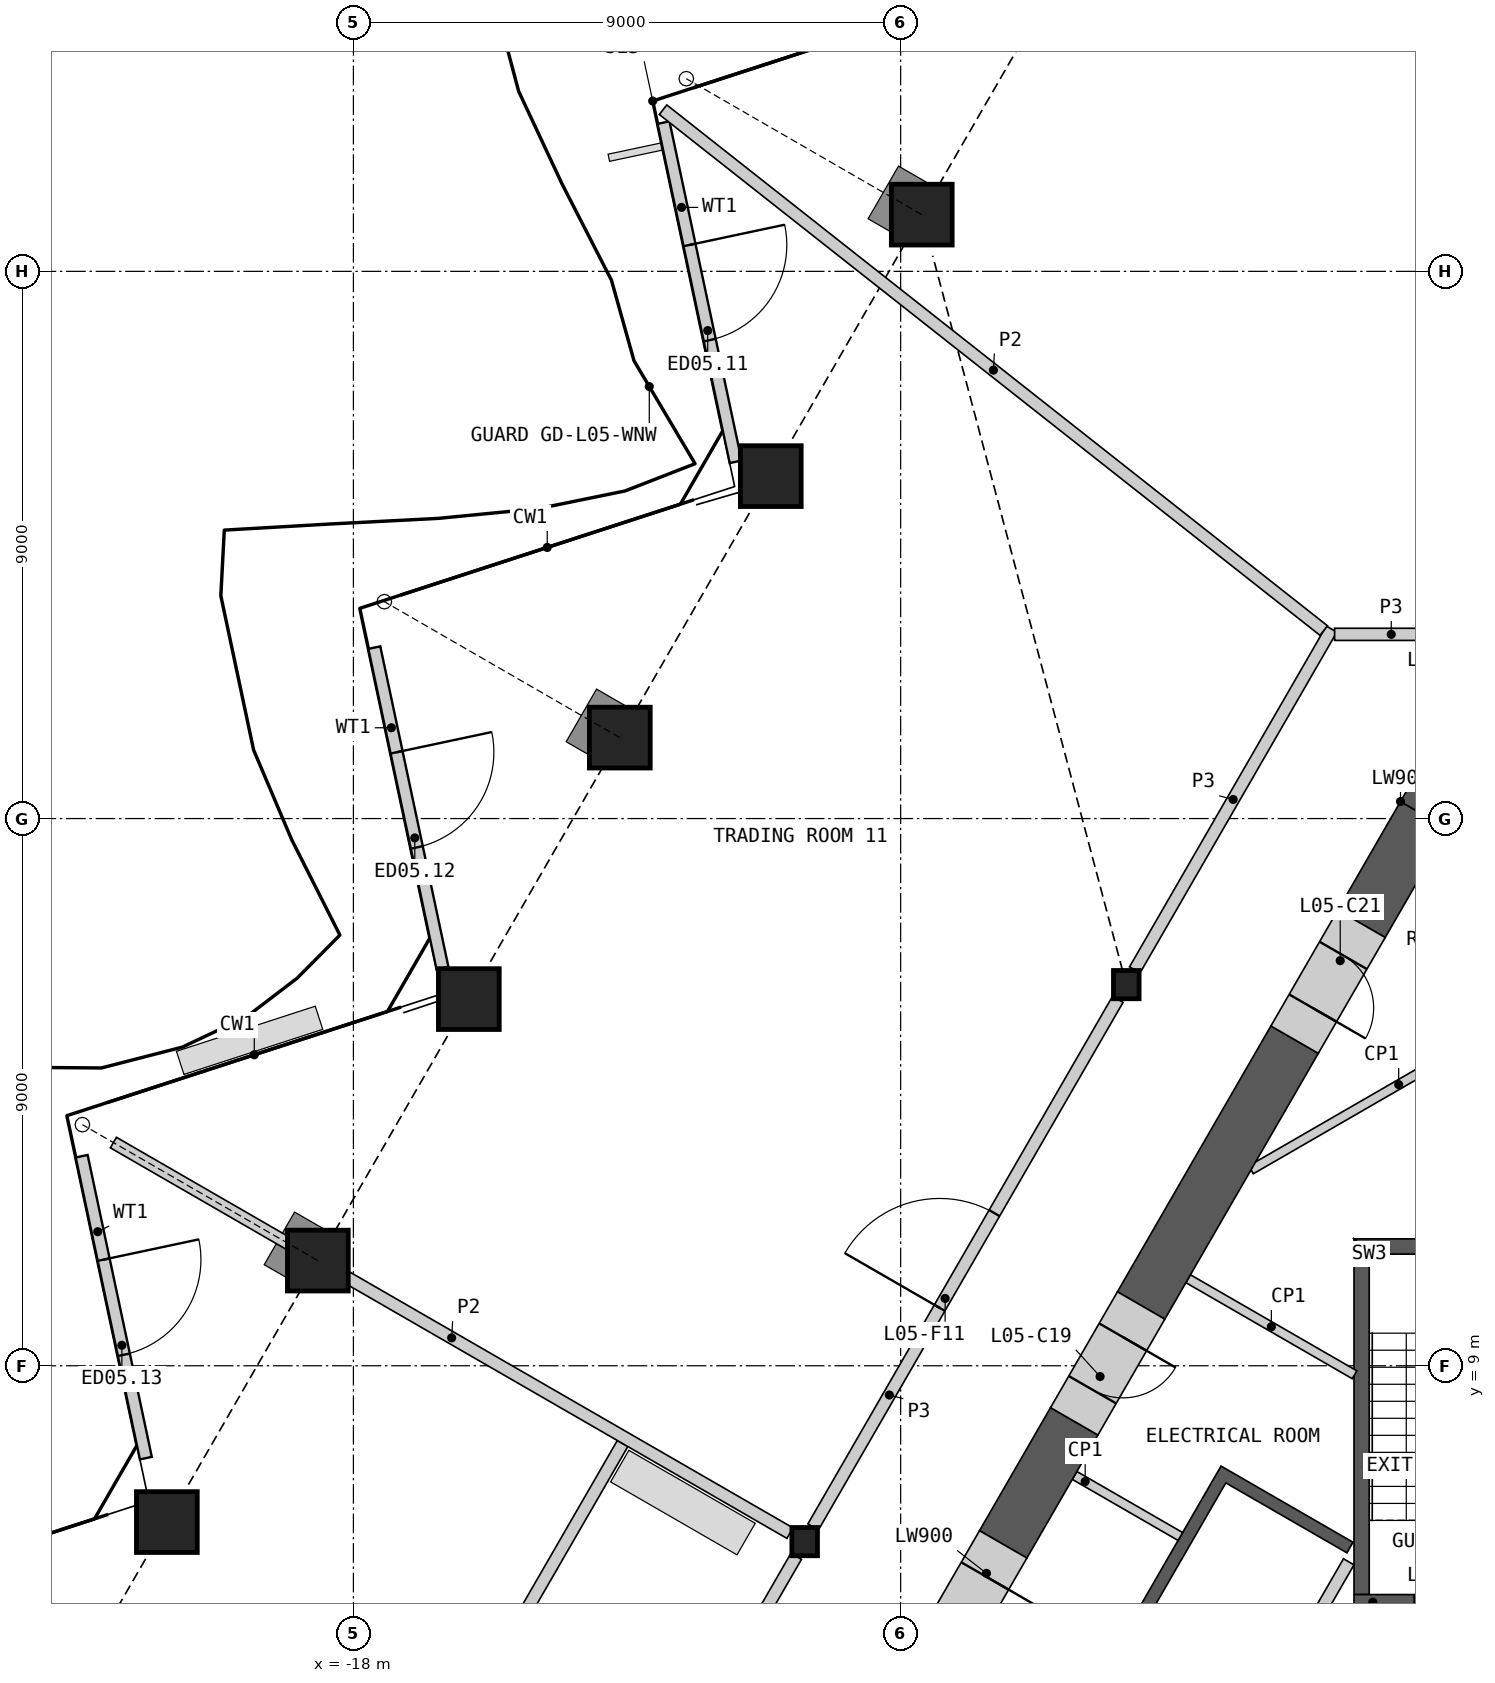
"""IFC4 building model, lengths in metres.
Left out: names, types, materials, properties, quantities, classifications, styles, units other than length and angle.
Written with IfcOpenShell. Run it as: python <this file> out.ifc"""

import sys

from ifc_helpers import new_model, si_unit, direction, frame, frame_2d, origin, origin_2d, place, context, subcontext, project, spatial, polyline, rectangle, hollow_rectangle, i_section, outline, extrude, element, fill, save


model = new_model("IFC4")
c1 = context("Model", 3, precision=1e-05, world=origin(), true_north=direction((0.0, 1.0)))
c2 = subcontext(c1, "Body", "Model", "MODEL_VIEW")
j1 = project(units=[si_unit("LENGTHUNIT", "METRE"), si_unit("PLANEANGLEUNIT", "RADIAN")], contexts=[c1])
p1 = place(None, origin())
s1 = spatial("IfcSite", under=j1, at=p1, CompositionType="ELEMENT")
p2 = place(p1, origin())
s2 = spatial("IfcBuilding", under=s1, at=p2, CompositionType="ELEMENT")
p3 = place(p2, frame((0.0, 0.0, 30.0)))
s3 = spatial("IfcBuildingStorey", under=s2, at=p3, CompositionType="ELEMENT", Elevation=30.0)
p4 = place(p3, frame((-8.653, 27.933, 0.0), z_axis=(-0.631248593533, 0.36445433234, 0.684615405028), x_axis=(-0.500002867593, -0.866023748172, 0.0)))
e1 = element("IfcColumn", 1, at=p4, inside=s3, PredefinedType="COLUMN", context=c2, shape_type="SweptSolid", body=[
    extrude(hollow_rectangle(XDim=1.0, YDim=1.0, WallThickness=0.07, at=origin_2d()), frame((0.0, 0.0, 0.532)), (0.0, 0.0, 1.0), 5.07),
])
p5 = place(p3, frame((-11.136, 23.632, 0.0), z_axis=(0.0, 0.0, 1.0), x_axis=(1.0, 0.0, 0.0)))
e2 = element("IfcColumn", 2, at=p5, inside=s3, PredefinedType="COLUMN", context=c2, shape_type="SweptSolid", body=[
    extrude(hollow_rectangle(XDim=1.0, YDim=1.0, WallThickness=0.07, at=origin_2d()), origin(), (0.0, 0.0, 1.0), 4.2),
])
p6 = place(p3, frame((-13.619, 19.332, 0.0), z_axis=(-0.631257748816, 0.364419821328, 0.684625334313), x_axis=(-0.499961918033, -0.866047389302, 0.0)))
e3 = element("IfcColumn", 3, at=p6, inside=s3, PredefinedType="COLUMN", context=c2, shape_type="SweptSolid", body=[
    extrude(hollow_rectangle(XDim=1.0, YDim=1.0, WallThickness=0.07, at=origin_2d()), frame((0.0, 0.0, 0.532)), (0.0, 0.0, 1.0), 5.07),
])
p7 = place(p3, frame((-16.102, 15.031, 0.0), z_axis=(0.0, 0.0, 1.0), x_axis=(1.0, 0.0, 0.0)))
e4 = element("IfcColumn", 4, at=p7, inside=s3, PredefinedType="COLUMN", context=c2, shape_type="SweptSolid", body=[
    extrude(hollow_rectangle(XDim=1.0, YDim=1.0, WallThickness=0.07, at=origin_2d()), origin(), (0.0, 0.0, 1.0), 4.2),
])
p8 = place(p3, frame((-18.585, 10.73, 0.0), z_axis=(-0.631257748816, 0.364419821328, 0.684625334313), x_axis=(-0.499961918033, -0.866047389302, 0.0)))
e5 = element("IfcColumn", 5, at=p8, inside=s3, PredefinedType="COLUMN", context=c2, shape_type="SweptSolid", body=[
    extrude(hollow_rectangle(XDim=1.0, YDim=1.0, WallThickness=0.07, at=origin_2d()), frame((0.0, 0.0, 0.532)), (0.0, 0.0, 1.0), 5.07),
])
p9 = place(p3, frame((-21.068, 6.429, 0.0), z_axis=(0.0, 0.0, 1.0), x_axis=(1.0, 0.0, 0.0)))
e6 = element("IfcColumn", 6, at=p9, inside=s3, PredefinedType="COLUMN", context=c2, shape_type="SweptSolid", body=[
    extrude(hollow_rectangle(XDim=1.0, YDim=1.0, WallThickness=0.07, at=origin_2d()), origin(), (0.0, 0.0, 1.0), 4.2),
])
for number, where, z_axis, x_axis in (
    (7, (-5.289, 15.269, 0.0), (0.0, 0.0, 1.0), (1.0, 0.0, 0.0)),
    (8, (-10.578, 6.107, 0.0), (0.0, 0.0, 1.0), (1.0, 0.0, 0.0)),
):
    element("IfcColumn", number, at=place(p3, frame(where, z_axis=z_axis, x_axis=x_axis)), inside=s3, PredefinedType="COLUMN", context=c2, shape_type="SweptSolid", body=[
        extrude(i_section(OverallWidth=0.421, OverallDepth=0.465, WebThickness=0.045, FlangeThickness=0.072, at=origin_2d()), origin(), (0.0, 0.0, 1.0), 4.2),
    ])
p10 = place(p3, frame((-12.9, 29.447, 0.0), z_axis=(0.0, 0.0, 1.0), x_axis=(0.207929909881, -0.978143727975, 0.0)))
e9 = element("IfcWall", 9, at=p10, inside=s3, PredefinedType="SOLIDWALL", context=c2, shape_type="SweptSolid", body=[
    extrude(rectangle(XDim=5.704, YDim=0.2, at=frame_2d((2.852, 0.0))), origin(), (0.0, 0.0, 1.0), 3.189),
])
p11 = place(p10, frame((2.057, 0.0, 0.0)))
e10 = element("IfcOpeningElement", 10, at=p11, cuts=e9, PredefinedType="OPENING", context=c2, shape_type="SweptSolid", body=[
    extrude(rectangle(XDim=1.6, YDim=2.4, at=frame_2d((0.8, 1.2))), frame((0.0, 0.11, 0.0), z_axis=(0.0, -1.0, 0.0), x_axis=(1.0, 0.0, 0.0)), (0.0, 0.0, 1.0), 0.22),
])
p12 = place(p3, frame((-17.656, 20.812, 0.0), z_axis=(0.0, 0.0, 1.0), x_axis=(0.207929714578, -0.978143769492, 0.0)))
e11 = element("IfcWall", 11, at=p12, inside=s3, PredefinedType="SOLIDWALL", context=c2, shape_type="SweptSolid", body=[
    extrude(rectangle(XDim=5.391, YDim=0.2, at=frame_2d((2.695, 0.0))), origin(), (0.0, 0.0, 1.0), 3.189),
])
p13 = place(p12, frame((1.76, 0.0, 0.0)))
e12 = element("IfcOpeningElement", 12, at=p13, cuts=e11, PredefinedType="OPENING", context=c2, shape_type="SweptSolid", body=[
    extrude(rectangle(XDim=1.6, YDim=2.4, at=frame_2d((0.8, 1.2))), frame((0.0, 0.11, 0.0), z_axis=(0.0, -1.0, 0.0), x_axis=(1.0, 0.0, 0.0)), (0.0, 0.0, 1.0), 0.22),
])
p14 = place(p3, frame((-22.469, 12.446, 0.0), z_axis=(0.0, 0.0, 1.0), x_axis=(0.207903044531, -0.978149438519, 0.0)))
e13 = element("IfcWall", 13, at=p14, inside=s3, PredefinedType="SOLIDWALL", context=c2, shape_type="SweptSolid", body=[
    extrude(rectangle(XDim=5.076, YDim=0.2, at=frame_2d((2.538, 0.0))), origin(), (0.0, 0.0, 1.0), 3.189),
])
p15 = place(p14, frame((1.738, 0.0, 0.0)))
e14 = element("IfcOpeningElement", 14, at=p15, cuts=e13, PredefinedType="OPENING", context=c2, shape_type="SweptSolid", body=[
    extrude(rectangle(XDim=1.6, YDim=2.4, at=frame_2d((0.8, 1.2))), frame((0.0, 0.11, 0.0), z_axis=(0.0, -1.0, 0.0), x_axis=(1.0, 0.0, 0.0)), (0.0, 0.0, 1.0), 0.22),
])
p16 = place(p3, origin())
e15 = element("IfcWall", 15, at=p16, inside=s3, PredefinedType="SHEAR", context=c2, shape_type="SweptSolid", body=[
    extrude(outline(polyline([(-4.96, 0.208), (-7.131, 1.461), (-3.731, 7.35), (-1.561, 6.097), (-1.66, 5.924), (-3.652, 7.074), (-5.752, 3.437), (-3.76, 2.287), (-3.861, 2.113), (-5.852, 3.263), (-6.852, 1.531), (-4.861, 0.381), (-4.96, 0.208)])), origin(), (0.0, 0.0, 1.0), 3.8),
])
p17 = place(p3, frame((-1.631, 5.776, 0.0), z_axis=(0.0, 0.0, 1.0), x_axis=(-0.499992876559, -0.866029516466, 0.0)))
e16 = element("IfcWall", 16, at=p17, inside=s3, PredefinedType="SOLIDWALL", context=c2, shape_type="SweptSolid", body=[
    extrude(rectangle(XDim=6.486, YDim=0.2, at=frame_2d((3.243, 0.0))), origin(), (0.0, 0.0, 1.0), 3.8),
])
p18 = place(p17, frame((1.537, 0.0, 0.0)))
e17 = element("IfcOpeningElement", 17, at=p18, cuts=e16, PredefinedType="OPENING", context=c2, shape_type="SweptSolid", body=[
    extrude(rectangle(XDim=0.9, YDim=2.1, at=frame_2d((0.45, 1.05))), frame((0.0, 0.11, 0.0), z_axis=(0.0, -1.0, 0.0), x_axis=(1.0, 0.0, 0.0)), (0.0, 0.0, 1.0), 0.22),
])
p19 = place(p3, origin())
e18 = element("IfcWall", 18, at=p19, inside=s3, PredefinedType="SHEAR", context=c2, shape_type="SweptSolid", body=[
    extrude(outline(polyline([(1.544, 11.087), (-1.544, 11.087), (-1.294, 10.837), (1.294, 10.837), (1.544, 11.087)])), origin(), (0.0, 0.0, 1.0), 3.8),
])
p20 = place(p3, origin())
e19 = element("IfcWall", 19, at=p20, inside=s3, PredefinedType="SHEAR", context=c2, shape_type="SweptSolid", body=[
    extrude(outline(polyline([(-1.294, 10.837), (-1.544, 11.087), (-1.544, 5.237), (-1.294, 5.237), (-1.294, 10.837)])), origin(), (0.0, 0.0, 1.0), 3.8),
])
p21 = place(p3, frame((1.544, 5.112, 0.0), z_axis=(0.0, 0.0, 1.0), x_axis=(-1.0, 0.0, 0.0)))
e20 = element("IfcWall", 20, at=p21, inside=s3, PredefinedType="SHEAR", context=c2, shape_type="SweptSolid", body=[
    extrude(rectangle(XDim=3.088, YDim=0.25, at=frame_2d((1.544, 0.0))), origin(), (0.0, 0.0, 1.0), 3.8),
])
p22 = place(p21, frame((0.994, 0.0, 0.0)))
e21 = element("IfcOpeningElement", 21, at=p22, cuts=e20, PredefinedType="OPENING", context=c2, shape_type="SweptSolid", body=[
    extrude(rectangle(XDim=1.1, YDim=2.1, at=frame_2d((0.55, 1.05))), frame((0.0, 0.135, 0.0), z_axis=(0.0, -1.0, 0.0), x_axis=(1.0, 0.0, 0.0)), (0.0, 0.0, 1.0), 0.27),
])
p23 = place(p3, frame((-6.139, 7.196, 0.0), z_axis=(0.0, 0.0, 1.0), x_axis=(0.866035824272, -0.499981950752, 0.0)))
e22 = element("IfcWall", 22, at=p23, inside=s3, PredefinedType="PARTITIONING", context=c2, shape_type="SweptSolid", body=[
    extrude(rectangle(XDim=2.009, YDim=0.15, at=frame_2d((1.004, 0.0))), origin(), (0.0, 0.0, 1.0), 3.8),
])
p24 = place(p3, frame((-4.271, 10.432, 0.0), z_axis=(0.0, 0.0, 1.0), x_axis=(0.866018279777, -0.50001233894, 0.0)))
e23 = element("IfcWall", 23, at=p24, inside=s3, PredefinedType="PARTITIONING", context=c2, shape_type="SweptSolid", body=[
    extrude(rectangle(XDim=3.159, YDim=0.15, at=frame_2d((1.58, 0.0))), origin(), (0.0, 0.0, 1.0), 3.8),
])
p25 = place(p3, frame((1.619, 15.026, 0.0), z_axis=(0.0, 0.0, 1.0), x_axis=(-0.866015917575, -0.500016430238, 0.0)))
e24 = element("IfcWall", 24, at=p25, inside=s3, PredefinedType="PARTITIONING", context=c2, shape_type="SweptSolid", body=[
    extrude(rectangle(XDim=5.607, YDim=0.15, at=frame_2d((2.804, 0.0))), origin(), (0.0, 0.0, 1.0), 3.8),
])
p26 = place(p3, frame((-2.521, 14.364, 0.0), z_axis=(0.0, 0.0, 1.0), x_axis=(-0.500014099723, -0.866017263153, 0.0)))
e25 = element("IfcWall", 25, at=p26, inside=s3, PredefinedType="SHEAR", context=c2, shape_type="SweptSolid", body=[
    extrude(rectangle(XDim=5.048, YDim=0.9, at=frame_2d((2.524, 0.0))), origin(), (0.0, 0.0, 1.0), 3.8),
])
p27 = place(p3, frame((-6.145, 8.086, 0.0), z_axis=(0.0, 0.0, 1.0), x_axis=(-0.500026924946, -0.866009858102, 0.0)))
e26 = element("IfcWall", 26, at=p27, inside=s3, PredefinedType="SHEAR", context=c2, shape_type="SweptSolid", body=[
    extrude(rectangle(XDim=2.337, YDim=0.9, at=frame_2d((1.168, 0.0))), origin(), (0.0, 0.0, 1.0), 3.8),
])
p28 = place(p3, frame((-0.39, 18.055, 0.0), z_axis=(0.0, 0.0, 1.0), x_axis=(-0.500009360108, -0.866019999656, 0.0)))
e27 = element("IfcWall", 27, at=p28, inside=s3, PredefinedType="SHEAR", context=c2, shape_type="SweptSolid", body=[
    extrude(rectangle(XDim=2.062, YDim=0.9, at=frame_2d((1.031, 0.0))), origin(), (0.0, 0.0, 1.0), 3.8),
])
p29 = place(p3, origin())
e28 = element("IfcWall", 28, at=p29, inside=s3, PredefinedType="SHEAR", context=c2, shape_type="SweptSolid", body=[
    extrude(outline(polyline([(-0.779, 18.28), (0.0, 19.63), (0.779, 18.28), (0.0, 17.83), (-0.779, 18.28)])), origin(), (0.0, 0.0, 1.0), 3.8),
])
p30 = place(p3, frame((-7.313, 6.062, 0.0), z_axis=(0.0, 0.0, 1.0), x_axis=(-0.500077893725, -0.86598042715, 0.0)))
e29 = element("IfcWall", 29, at=p30, inside=s3, PredefinedType="SHEAR", context=c2, shape_type="SweptSolid", body=[
    extrude(rectangle(XDim=2.2, YDim=0.9, at=frame_2d((1.1, 0.0))), origin(), (0.0, 0.0, 1.0), 3.8),
])
p31 = place(p30, frame((0.6, 0.0, 0.0)))
e30 = element("IfcOpeningElement", 30, at=p31, cuts=e29, PredefinedType="OPENING", context=c2, shape_type="SweptSolid", body=[
    extrude(rectangle(XDim=1.0, YDim=2.1, at=frame_2d((0.5, 1.05))), frame((0.0, 0.46, 0.0), z_axis=(0.0, -1.0, 0.0), x_axis=(1.0, 0.0, 0.0)), (0.0, 0.0, 1.0), 0.92),
])
p32 = place(p3, frame((-5.045, 9.992, 0.0), z_axis=(0.0, 0.0, 1.0), x_axis=(-0.499898558967, -0.866083962871, 0.0)))
e31 = element("IfcWall", 31, at=p32, inside=s3, PredefinedType="SHEAR", context=c2, shape_type="SweptSolid", body=[
    extrude(rectangle(XDim=2.2, YDim=0.9, at=frame_2d((1.1, 0.0))), origin(), (0.0, 0.0, 1.0), 3.8),
])
p33 = place(p32, frame((0.6, 0.0, 0.0)))
e32 = element("IfcOpeningElement", 32, at=p33, cuts=e31, PredefinedType="OPENING", context=c2, shape_type="SweptSolid", body=[
    extrude(rectangle(XDim=1.0, YDim=2.1, at=frame_2d((0.5, 1.05))), frame((0.0, 0.46, 0.0), z_axis=(0.0, -1.0, 0.0), x_axis=(1.0, 0.0, 0.0)), (0.0, 0.0, 1.0), 0.92),
])
p34 = place(p3, frame((-1.421, 16.269, 0.0), z_axis=(0.0, 0.0, 1.0), x_axis=(-0.50002983664, -0.866008176907, 0.0)))
e33 = element("IfcWall", 33, at=p34, inside=s3, PredefinedType="SHEAR", context=c2, shape_type="SweptSolid", body=[
    extrude(rectangle(XDim=2.2, YDim=0.9, at=frame_2d((1.1, 0.0))), origin(), (0.0, 0.0, 1.0), 3.8),
])
p35 = place(p34, frame((0.6, 0.0, 0.0)))
e34 = element("IfcOpeningElement", 34, at=p35, cuts=e33, PredefinedType="OPENING", context=c2, shape_type="SweptSolid", body=[
    extrude(rectangle(XDim=1.0, YDim=2.1, at=frame_2d((0.5, 1.05))), frame((0.0, 0.46, 0.0), z_axis=(0.0, -1.0, 0.0), x_axis=(1.0, 0.0, 0.0)), (0.0, 0.0, 1.0), 0.92),
])
p36 = place(p3, frame((-10.439, 6.35, 0.0), z_axis=(0.0, 0.0, 1.0), x_axis=(0.50001002959, 0.86601961312, 0.0)))
e35 = element("IfcWall", 35, at=p36, inside=s3, PredefinedType="PARTITIONING", context=c2, shape_type="SweptSolid", body=[
    extrude(rectangle(XDim=10.019, YDim=0.2, at=frame_2d((5.009, 0.0))), origin(), (0.0, 0.0, 1.0), 3.8),
])
p37 = place(p36, frame((4.16, 0.0, 0.0)))
e36 = element("IfcOpeningElement", 36, at=p37, cuts=e35, PredefinedType="OPENING", context=c2, shape_type="SweptSolid", body=[
    extrude(rectangle(XDim=1.8, YDim=2.1, at=frame_2d((0.9, 1.05))), frame((0.0, 0.11, 0.0), z_axis=(0.0, -1.0, 0.0), x_axis=(1.0, 0.0, 0.0)), (0.0, 0.0, 1.0), 0.22),
])
p38 = place(p3, frame((-15.728, -2.811, 0.0), z_axis=(0.0, 0.0, 1.0), x_axis=(0.49999175339, 0.866030164915, 0.0)))
e37 = element("IfcWall", 37, at=p38, inside=s3, PredefinedType="PARTITIONING", context=c2, shape_type="SweptSolid", body=[
    extrude(rectangle(XDim=10.019, YDim=0.2, at=frame_2d((5.009, 0.0))), origin(), (0.0, 0.0, 1.0), 3.8),
])
p39 = place(p38, frame((4.484, 0.0, 0.0)))
e38 = element("IfcOpeningElement", 38, at=p39, cuts=e37, PredefinedType="OPENING", context=c2, shape_type="SweptSolid", body=[
    extrude(rectangle(XDim=0.95, YDim=2.1, at=frame_2d((0.475, 1.05))), frame((0.0, 0.11, 0.0), z_axis=(0.0, -1.0, 0.0), x_axis=(1.0, 0.0, 0.0)), (0.0, 0.0, 1.0), 0.22),
])
p40 = place(p3, frame((-5.149, 15.511, 0.0), z_axis=(0.0, 0.0, 1.0), x_axis=(0.500001069878, 0.866024786089, 0.0)))
e39 = element("IfcWall", 39, at=p40, inside=s3, PredefinedType="PARTITIONING", context=c2, shape_type="SweptSolid", body=[
    extrude(rectangle(XDim=6.473, YDim=0.2, at=frame_2d((3.236, 0.0))), origin(), (0.0, 0.0, 1.0), 3.8),
])
p41 = place(p3, frame((-1.863, 21.03, 0.0), z_axis=(0.0, 0.0, 1.0), x_axis=(1.0, 0.0, 0.0)))
e40 = element("IfcWall", 40, at=p41, inside=s3, PredefinedType="PARTITIONING", context=c2, shape_type="SweptSolid", body=[
    extrude(rectangle(XDim=3.726, YDim=0.2, at=frame_2d((1.863, 0.0))), origin(), (0.0, 0.0, 1.0), 3.8),
])
p42 = place(p41, frame((1.363, 0.0, 0.0)))
e41 = element("IfcOpeningElement", 41, at=p42, cuts=e40, PredefinedType="OPENING", context=c2, shape_type="SweptSolid", body=[
    extrude(rectangle(XDim=1.0, YDim=2.1, at=frame_2d((0.5, 1.05))), frame((0.0, 0.11, 0.0), z_axis=(0.0, -1.0, 0.0), x_axis=(1.0, 0.0, 0.0)), (0.0, 0.0, 1.0), 0.22),
])
p43 = place(p3, frame((-22.335, -7.455, 0.0), z_axis=(0.0, 0.0, 1.0), x_axis=(0.499997414609, 0.866026896456, 0.0)))
e42 = element("IfcWall", 42, at=p43, inside=s3, PredefinedType="PARTITIONING", context=c2, shape_type="SweptSolid", body=[
    extrude(rectangle(XDim=17.524, YDim=0.2, at=frame_2d((8.762, 0.0))), origin(), (0.0, 0.0, 1.0), 2.885),
])
p44 = place(p43, frame((7.584, 0.0, 0.0)))
e43 = element("IfcOpeningElement", 43, at=p44, cuts=e42, PredefinedType="OPENING", context=c2, shape_type="SweptSolid", body=[
    extrude(rectangle(XDim=0.95, YDim=2.1, at=frame_2d((0.475, 1.05))), frame((0.0, 0.11, 0.0), z_axis=(0.0, -1.0, 0.0), x_axis=(1.0, 0.0, 0.0)), (0.0, 0.0, 1.0), 0.22),
])
p45 = place(p3, frame((-12.908, 29.659, 0.0), z_axis=(0.0, 0.0, 1.0), x_axis=(0.78529358076, -0.619123567648, 0.0)))
e44 = element("IfcWall", 44, at=p45, inside=s3, PredefinedType="PARTITIONING", context=c2, shape_type="SweptSolid", body=[
    extrude(rectangle(XDim=13.837, YDim=0.2, at=frame_2d((6.918, 0.0))), origin(), (0.0, 0.0, 1.0), 2.885),
])
p46 = place(p3, frame((-21.947, 12.671, 0.0), z_axis=(0.0, 0.0, 1.0), x_axis=(0.866026729935, -0.499997703033, 0.0)))
e45 = element("IfcWall", 45, at=p46, inside=s3, PredefinedType="PARTITIONING", context=c2, shape_type="SweptSolid", body=[
    extrude(rectangle(XDim=12.848, YDim=0.2, at=frame_2d((6.424, 0.0))), origin(), (0.0, 0.0, 1.0), 2.885),
])
p47 = place(p11, origin())
e46 = element("IfcDoor", 46, at=p47, inside=s3, OperationType="DOUBLE_DOOR_SINGLE_SWING", PredefinedType="DOOR", context=c2, shape_type="SweptSolid", body=[
    extrude(rectangle(XDim=1.6, YDim=2.4, at=frame_2d((0.8, 1.2))), frame((0.0, 0.025, 0.0), z_axis=(0.0, -1.0, 0.0), x_axis=(1.0, 0.0, 0.0)), (0.0, 0.0, 1.0), 0.05),
])
fill(e10, e46)
p48 = place(p13, origin())
e47 = element("IfcDoor", 47, at=p48, inside=s3, OperationType="DOUBLE_DOOR_SINGLE_SWING", PredefinedType="DOOR", context=c2, shape_type="SweptSolid", body=[
    extrude(rectangle(XDim=1.6, YDim=2.4, at=frame_2d((0.8, 1.2))), frame((0.0, 0.025, 0.0), z_axis=(0.0, -1.0, 0.0), x_axis=(1.0, 0.0, 0.0)), (0.0, 0.0, 1.0), 0.05),
])
fill(e12, e47)
p49 = place(p15, origin())
e48 = element("IfcDoor", 48, at=p49, inside=s3, OperationType="DOUBLE_DOOR_SINGLE_SWING", PredefinedType="DOOR", context=c2, shape_type="SweptSolid", body=[
    extrude(rectangle(XDim=1.6, YDim=2.4, at=frame_2d((0.8, 1.2))), frame((0.0, 0.025, 0.0), z_axis=(0.0, -1.0, 0.0), x_axis=(1.0, 0.0, 0.0)), (0.0, 0.0, 1.0), 0.05),
])
fill(e14, e48)
p50 = place(p22, origin())
e49 = element("IfcDoor", 49, at=p50, inside=s3, OperationType="SINGLE_SWING_LEFT", PredefinedType="DOOR", context=c2, shape_type="SweptSolid", body=[
    extrude(rectangle(XDim=1.1, YDim=2.1, at=frame_2d((0.55, 1.05))), frame((0.0, 0.025, 0.0), z_axis=(0.0, -1.0, 0.0), x_axis=(1.0, 0.0, 0.0)), (0.0, 0.0, 1.0), 0.05),
])
fill(e21, e49)
p51 = place(p31, origin())
e50 = element("IfcDoor", 50, at=p51, inside=s3, OperationType="SINGLE_SWING_LEFT", PredefinedType="DOOR", context=c2, shape_type="SweptSolid", body=[
    extrude(rectangle(XDim=1.0, YDim=2.1, at=frame_2d((0.5, 1.05))), frame((0.0, 0.205, 0.0), z_axis=(0.0, -1.0, 0.0), x_axis=(1.0, 0.0, 0.0)), (0.0, 0.0, 1.0), 0.05),
])
fill(e30, e50)
p52 = place(p33, origin())
e51 = element("IfcDoor", 51, at=p52, inside=s3, OperationType="SINGLE_SWING_LEFT", PredefinedType="DOOR", context=c2, shape_type="SweptSolid", body=[
    extrude(rectangle(XDim=1.0, YDim=2.1, at=frame_2d((0.5, 1.05))), frame((0.0, 0.205, 0.0), z_axis=(0.0, -1.0, 0.0), x_axis=(1.0, 0.0, 0.0)), (0.0, 0.0, 1.0), 0.05),
])
fill(e32, e51)
p53 = place(p35, origin())
e52 = element("IfcDoor", 52, at=p53, inside=s3, OperationType="SINGLE_SWING_RIGHT", PredefinedType="DOOR", context=c2, shape_type="SweptSolid", body=[
    extrude(rectangle(XDim=1.0, YDim=2.1, at=frame_2d((0.5, 1.05))), frame((0.0, 0.205, 0.0), z_axis=(0.0, -1.0, 0.0), x_axis=(1.0, 0.0, 0.0)), (0.0, 0.0, 1.0), 0.05),
])
fill(e34, e52)
p54 = place(p37, origin())
e53 = element("IfcDoor", 53, at=p54, inside=s3, OperationType="DOUBLE_DOOR_SINGLE_SWING", PredefinedType="DOOR", context=c2, shape_type="SweptSolid", body=[
    extrude(rectangle(XDim=1.8, YDim=2.1, at=frame_2d((0.9, 1.05))), frame((0.0, 0.025, 0.0), z_axis=(0.0, -1.0, 0.0), x_axis=(1.0, 0.0, 0.0)), (0.0, 0.0, 1.0), 0.05),
])
fill(e36, e53)
save(model, sys.argv[1])
